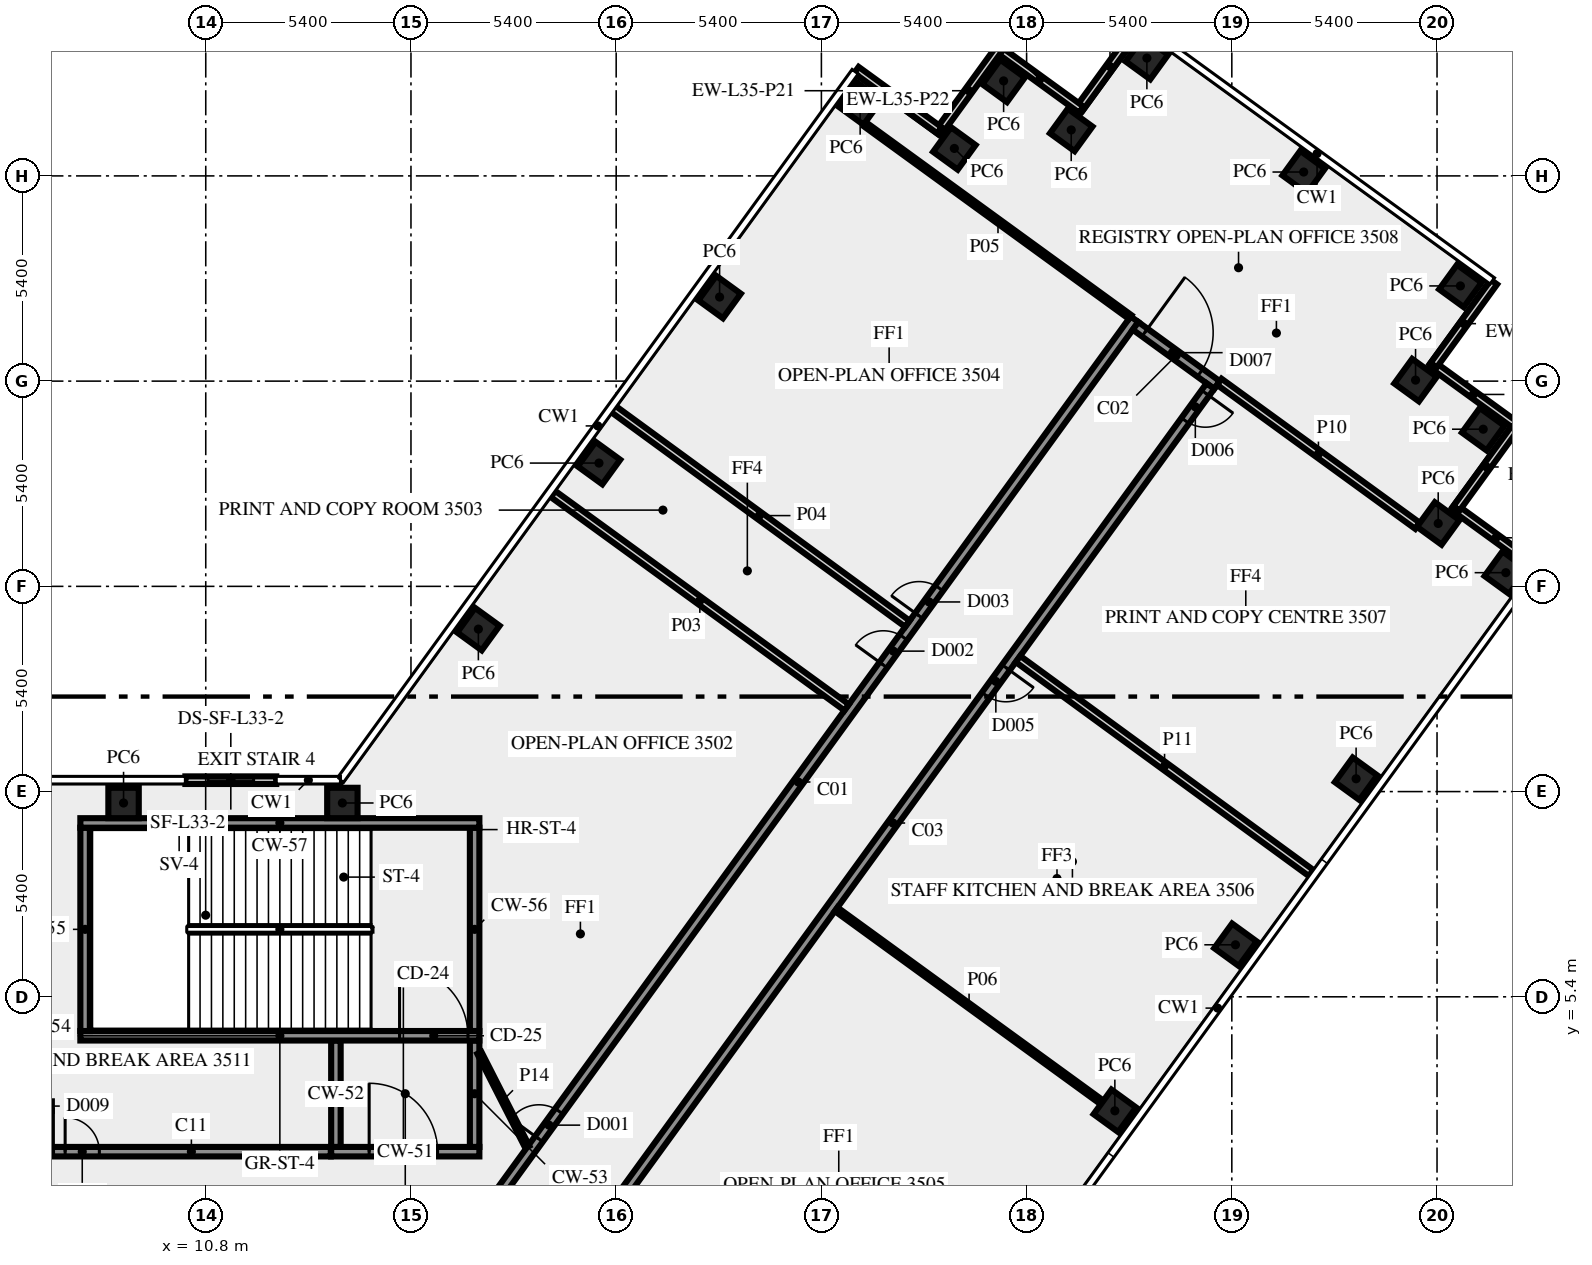
"""IFC4 building model, lengths in metres.
Left out: names, types, materials, properties, quantities, classifications, styles, units other than length and angle.
Written with IfcOpenShell. Run it as: python <this file> out.ifc"""

import sys

from ifc_helpers import new_model, si_unit, direction, frame, frame_2d, origin, origin_2d, place, context, subcontext, project, spatial, rectangle, extrude, element, fill, save


model = new_model("IFC4")
c1 = context("Model", 3, precision=1e-05, world=origin(), true_north=direction((0.0, 1.0)))
c2 = subcontext(c1, "Body", "Model", "MODEL_VIEW")
j1 = project(units=[si_unit("LENGTHUNIT", "METRE"), si_unit("PLANEANGLEUNIT", "RADIAN")], contexts=[c1])
p1 = place(None, origin())
s1 = spatial("IfcSite", under=j1, at=p1, CompositionType="ELEMENT")
p2 = place(p1, origin())
s2 = spatial("IfcBuilding", under=s1, at=p2, CompositionType="ELEMENT")
p3 = place(p2, frame((0.0, 0.0, 152.0)))
s3 = spatial("IfcBuildingStorey", under=s2, at=p3, CompositionType="ELEMENT", Elevation=152.0)
for number, where, z_axis, x_axis in (
    (1, (34.722, 2.4, 0.0), (0.0, 0.0, 1.0), (0.588, 0.809, 0.0)),
    (2, (37.896, 6.769, 0.0), (0.0, 0.0, 1.0), (0.588, 0.809, 0.0)),
    (3, (41.07, 11.137, 0.0), (0.0, 0.0, 1.0), (0.588, 0.809, 0.0)),
    (4, (45.01, 16.56, 0.0), (0.0, 0.0, 1.0), (0.588, 0.809, 0.0)),
    (5, (43.231, 17.854, 0.0), (0.0, 0.0, 1.0), (0.588, 0.809, 0.0)),
    (6, (44.415, 20.335, 0.0), (0.0, 0.0, 1.0), (0.588, 0.809, 0.0)),
    (7, (42.635, 21.626, 0.0), (0.0, 0.0, 1.0), (-0.809, 0.588, 0.0)),
    (8, (43.815, 24.105, 0.0), (0.0, 0.0, 1.0), (-0.809, 0.588, 0.0)),
    (9, (39.691, 27.102, 0.0), (0.0, 0.0, 1.0), (-0.809, 0.588, 0.0)),
    (10, (35.565, 30.1, 0.0), (0.0, 0.0, 1.0), (-0.588, -0.809, 0.0)),
    (11, (33.574, 28.209, 0.0), (0.0, 0.0, 1.0), (-0.809, 0.588, 0.0)),
    (12, (31.795, 29.5, 0.0), (0.0, 0.0, 1.0), (-0.588, -0.809, 0.0)),
    (13, (30.499, 27.723, 0.0), (0.0, 0.0, 1.0), (-0.809, 0.588, 0.0)),
    (14, (28.02, 28.905, 0.0), (0.0, 0.0, 1.0), (-0.809, 0.588, 0.0)),
    (15, (24.321, 23.812, 0.0), (0.0, 0.0, 1.0), (-0.588, -0.809, 0.0)),
    (16, (21.147, 19.444, 0.0), (0.0, 0.0, 1.0), (-0.588, -0.809, 0.0)),
    (17, (17.974, 15.075, 0.0), (0.0, 0.0, 1.0), (-0.588, -0.809, 0.0)),
    (18, (14.395, 10.5, 0.0), (0.0, 0.0, 1.0), (-1.0, 0.0, 0.0)),
    (19, (8.637, 10.5, 0.0), (0.0, 0.0, 1.0), (-1.0, 0.0, 0.0)),
):
    element("IfcColumn", number, at=place(p3, frame(where, z_axis=z_axis, x_axis=x_axis)), inside=s3, PredefinedType="COLUMN", context=c2, shape_type="SweptSolid", body=[
        extrude(rectangle(XDim=0.8, YDim=0.8, at=origin_2d()), origin(), (0.0, 0.0, 1.0), 3.65),
    ])
for number, where, z_axis, x_axis in (
    (20, (45.842, 16.685, 0.0), (0.0, 0.0, 1.0), (-0.809, 0.588, 0.0)),
    (21, (43.709, 18.249, 0.0), (0.0, 0.0, 1.0), (0.588, 0.809, 0.0)),
    (22, (45.245, 20.456, 0.0), (0.0, 0.0, 1.0), (-0.809, 0.588, 0.0)),
    (23, (43.113, 22.02, 0.0), (0.0, 0.0, 1.0), (0.588, 0.809, 0.0)),
    (24, (35.388, 30.97, 0.0), (0.0, 0.0, 1.0), (-0.588, -0.809, 0.0)),
    (25, (33.838, 28.744, 0.0), (0.0, 0.0, 1.0), (-0.809, 0.588, 0.0)),
    (26, (31.67, 30.333, 0.0), (0.0, 0.0, 1.0), (-0.588, -0.809, 0.0)),
    (27, (30.106, 28.2, 0.0), (0.0, 0.0, 1.0), (-0.809, 0.588, 0.0)),
):
    element("IfcWall", number, at=place(p3, frame(where, z_axis=z_axis, x_axis=x_axis)), inside=s3, PredefinedType="SOLIDWALL", context=c2, shape_type="SweptSolid", body=[
        extrude(rectangle(XDim=2.7, YDim=0.2, at=frame_2d((1.35, 0.0))), origin(), (0.0, 0.0, 1.0), 3.65),
    ])
p4 = place(p3, frame((12.655, 11.1, 0.0), z_axis=(0.0, 0.0, 1.0), x_axis=(-1.0, 0.0, 0.0)))
e28 = element("IfcWall", 28, at=p4, inside=s3, PredefinedType="SOLIDWALL", context=c2, shape_type="SweptSolid", body=[
    extrude(rectangle(XDim=2.392, YDim=0.2, at=frame_2d((1.196, 0.0))), origin(), (0.0, 0.0, 1.0), 3.65),
])
p5 = place(p4, frame((0.596, 0.0, 1.0)))
e29 = element("IfcOpeningElement", 29, at=p5, cuts=e28, PredefinedType="OPENING", context=c2, shape_type="SweptSolid", body=[
    extrude(rectangle(XDim=1.2, YDim=1.2, at=frame_2d((0.6, 0.6))), frame((0.0, 0.11, 0.0), z_axis=(0.0, -1.0, 0.0), x_axis=(1.0, 0.0, 0.0)), (0.0, 0.0, 1.0), 0.22),
])
p6 = place(p3, frame((14.1, 1.325, 0.0), z_axis=(0.0, 0.0, 1.0), x_axis=(1.0, 0.0, 0.0)))
e30 = element("IfcWall", 30, at=p6, inside=s3, PredefinedType="SHEAR", context=c2, shape_type="SweptSolid", body=[
    extrude(rectangle(XDim=3.9, YDim=0.25, at=frame_2d((1.95, 0.0))), origin(), (0.0, 0.0, 1.0), 3.65),
])
p7 = place(p6, frame((1.0, 0.0, 0.0)))
e31 = element("IfcOpeningElement", 31, at=p7, cuts=e30, PredefinedType="OPENING", context=c2, shape_type="SweptSolid", body=[
    extrude(rectangle(XDim=1.8, YDim=2.1, at=frame_2d((0.9, 1.05))), frame((0.0, 0.135, 0.0), z_axis=(0.0, -1.0, 0.0), x_axis=(1.0, 0.0, 0.0)), (0.0, 0.0, 1.0), 0.27),
])
for number, where, z_axis, x_axis in (
    (32, (14.225, 1.45, 0.0), (0.0, 0.0, 1.0), (0.0, 1.0, 0.0)),
    (33, (17.875, 1.45, 0.0), (0.0, 0.0, 1.0), (0.0, 1.0, 0.0)),
):
    element("IfcWall", number, at=place(p3, frame(where, z_axis=z_axis, x_axis=x_axis)), inside=s3, PredefinedType="SHEAR", context=c2, shape_type="SweptSolid", body=[
        extrude(rectangle(XDim=2.8, YDim=0.25, at=frame_2d((1.4, 0.0))), origin(), (0.0, 0.0, 1.0), 3.65),
    ])
p8 = place(p3, frame((7.5, 4.375, 0.0), z_axis=(0.0, 0.0, 1.0), x_axis=(1.0, 0.0, 0.0)))
e34 = element("IfcWall", 34, at=p8, inside=s3, PredefinedType="SHEAR", context=c2, shape_type="SweptSolid", body=[
    extrude(rectangle(XDim=10.5, YDim=0.25, at=frame_2d((5.25, 0.0))), origin(), (0.0, 0.0, 1.0), 3.65),
])
p9 = place(p8, frame((8.4, 0.0, 0.0)))
e35 = element("IfcOpeningElement", 35, at=p9, cuts=e34, PredefinedType="OPENING", context=c2, shape_type="SweptSolid", body=[
    extrude(rectangle(XDim=1.8, YDim=2.1, at=frame_2d((0.9, 1.05))), frame((0.0, 0.135, 0.0), z_axis=(0.0, -1.0, 0.0), x_axis=(1.0, 0.0, 0.0)), (0.0, 0.0, 1.0), 0.27),
])
for number, where, z_axis, x_axis in (
    (36, (7.625, 4.5, 0.0), (0.0, 0.0, 1.0), (0.0, 1.0, 0.0)),
    (37, (17.875, 4.5, 0.0), (0.0, 0.0, 1.0), (0.0, 1.0, 0.0)),
):
    element("IfcWall", number, at=place(p3, frame(where, z_axis=z_axis, x_axis=x_axis)), inside=s3, PredefinedType="SHEAR", context=c2, shape_type="SweptSolid", body=[
        extrude(rectangle(XDim=5.35, YDim=0.25, at=frame_2d((2.675, 0.0))), origin(), (0.0, 0.0, 1.0), 3.65),
    ])
p10 = place(p3, frame((7.5, 9.975, 0.0), z_axis=(0.0, 0.0, 1.0), x_axis=(1.0, 0.0, 0.0)))
e38 = element("IfcWall", 38, at=p10, inside=s3, PredefinedType="SHEAR", context=c2, shape_type="SweptSolid", body=[
    extrude(rectangle(XDim=10.5, YDim=0.25, at=frame_2d((5.25, 0.0))), origin(), (0.0, 0.0, 1.0), 3.65),
])
p11 = place(p10, frame((2.0, 0.0, 1.0)))
e39 = element("IfcOpeningElement", 39, at=p11, cuts=e38, PredefinedType="OPENING", context=c2, shape_type="SweptSolid", body=[
    extrude(rectangle(XDim=1.2, YDim=1.2, at=frame_2d((0.6, 0.6))), frame((0.0, 0.135, 0.0), z_axis=(0.0, -1.0, 0.0), x_axis=(1.0, 0.0, 0.0)), (0.0, 0.0, 1.0), 0.27),
])
p12 = place(p3, frame((17.545, -1.125, 0.0), z_axis=(0.0, 0.0, 1.0), x_axis=(0.587786330937, 0.809016210693, 0.0)))
e40 = element("IfcWall", 40, at=p12, inside=s3, PredefinedType="SOLIDWALL", context=c2, shape_type="SweptSolid", body=[
    extrude(rectangle(XDim=30.103, YDim=0.25, at=frame_2d((15.052, 0.0))), origin(), (0.0, 0.0, 1.0), 3.65),
])
p13 = place(p12, frame((3.441, 0.0, 0.0)))
e41 = element("IfcOpeningElement", 41, at=p13, cuts=e40, PredefinedType="OPENING", context=c2, shape_type="SweptSolid", body=[
    extrude(rectangle(XDim=0.9, YDim=2.1, at=frame_2d((0.45, 1.05))), frame((0.0, 0.135, 0.0), z_axis=(0.0, -1.0, 0.0), x_axis=(1.0, 0.0, 0.0)), (0.0, 0.0, 1.0), 0.27),
])
p14 = place(p12, frame((20.457, 0.0, 0.0)))
e42 = element("IfcOpeningElement", 42, at=p14, cuts=e40, PredefinedType="OPENING", context=c2, shape_type="SweptSolid", body=[
    extrude(rectangle(XDim=0.9, YDim=2.1, at=frame_2d((0.45, 1.05))), frame((0.0, 0.135, 0.0), z_axis=(0.0, -1.0, 0.0), x_axis=(1.0, 0.0, 0.0)), (0.0, 0.0, 1.0), 0.27),
])
p15 = place(p12, frame((18.858, 0.0, 0.0)))
e43 = element("IfcOpeningElement", 43, at=p15, cuts=e40, PredefinedType="OPENING", context=c2, shape_type="SweptSolid", body=[
    extrude(rectangle(XDim=0.9, YDim=2.1, at=frame_2d((0.45, 1.05))), frame((0.0, 0.135, 0.0), z_axis=(0.0, -1.0, 0.0), x_axis=(1.0, 0.0, 0.0)), (0.0, 0.0, 1.0), 0.27),
])
p16 = place(p3, frame((35.267, 23.054, 0.0), z_axis=(0.0, 0.0, 1.0), x_axis=(0.809038743598, -0.587755315891, 0.0)))
e44 = element("IfcWall", 44, at=p16, inside=s3, PredefinedType="SOLIDWALL", context=c2, shape_type="SweptSolid", body=[
    extrude(rectangle(XDim=2.65, YDim=0.25, at=frame_2d((1.325, 0.0))), origin(), (0.0, 0.0, 1.0), 3.65),
])
p17 = place(p16, frame((0.3, 0.0, 0.0)))
e45 = element("IfcOpeningElement", 45, at=p17, cuts=e44, PredefinedType="OPENING", context=c2, shape_type="SweptSolid", body=[
    extrude(rectangle(XDim=1.8, YDim=2.1, at=frame_2d((0.9, 1.05))), frame((0.0, 0.135, 0.0), z_axis=(0.0, -1.0, 0.0), x_axis=(1.0, 0.0, 0.0)), (0.0, 0.0, 1.0), 0.27),
])
p18 = place(p3, frame((37.236, 21.469, 0.0), z_axis=(0.0, 0.0, 1.0), x_axis=(-0.58778344073, -0.809018310549, 0.0)))
e46 = element("IfcWall", 46, at=p18, inside=s3, PredefinedType="SOLIDWALL", context=c2, shape_type="SweptSolid", body=[
    extrude(rectangle(XDim=28.42, YDim=0.25, at=frame_2d((14.21, 0.0))), origin(), (0.0, 0.0, 1.0), 3.65),
])
p19 = place(p18, frame((26.988, 0.0, 0.0)))
e47 = element("IfcOpeningElement", 47, at=p19, cuts=e46, PredefinedType="OPENING", context=c2, shape_type="SweptSolid", body=[
    extrude(rectangle(XDim=0.9, YDim=2.1, at=frame_2d((0.45, 1.05))), frame((0.0, 0.135, 0.0), z_axis=(0.0, -1.0, 0.0), x_axis=(1.0, 0.0, 0.0)), (0.0, 0.0, 1.0), 0.27),
])
p20 = place(p18, frame((0.224, 0.0, 0.0)))
e48 = element("IfcOpeningElement", 48, at=p20, cuts=e46, PredefinedType="OPENING", context=c2, shape_type="SweptSolid", body=[
    extrude(rectangle(XDim=0.9, YDim=2.1, at=frame_2d((0.45, 1.05))), frame((0.0, 0.135, 0.0), z_axis=(0.0, -1.0, 0.0), x_axis=(1.0, 0.0, 0.0)), (0.0, 0.0, 1.0), 0.27),
])
p21 = place(p18, frame((9.155, 0.0, 0.0)))
e49 = element("IfcOpeningElement", 49, at=p21, cuts=e46, PredefinedType="OPENING", context=c2, shape_type="SweptSolid", body=[
    extrude(rectangle(XDim=0.9, YDim=2.1, at=frame_2d((0.45, 1.05))), frame((0.0, 0.135, 0.0), z_axis=(0.0, -1.0, 0.0), x_axis=(1.0, 0.0, 0.0)), (0.0, 0.0, 1.0), 0.27),
])
p22 = place(p3, frame((6.754, 1.325, 0.0), z_axis=(0.0, 0.0, 1.0), x_axis=(1.0, 0.0, 0.0)))
e50 = element("IfcWall", 50, at=p22, inside=s3, PredefinedType="SOLIDWALL", context=c2, shape_type="SweptSolid", body=[
    extrude(rectangle(XDim=7.336, YDim=0.25, at=frame_2d((3.668, 0.0))), origin(), (0.0, 0.0, 1.0), 3.65),
])
p23 = place(p22, frame((0.346, 0.0, 0.0)))
e51 = element("IfcOpeningElement", 51, at=p23, cuts=e50, PredefinedType="OPENING", context=c2, shape_type="SweptSolid", body=[
    extrude(rectangle(XDim=0.9, YDim=2.1, at=frame_2d((0.45, 1.05))), frame((0.0, 0.135, 0.0), z_axis=(0.0, -1.0, 0.0), x_axis=(1.0, 0.0, 0.0)), (0.0, 0.0, 1.0), 0.27),
])
p24 = place(p3, frame((27.664, 13.016, 0.0), z_axis=(0.0, 0.0, 1.0), x_axis=(-0.80900684162, 0.587799226107, 0.0)))
e52 = element("IfcWall", 52, at=p24, inside=s3, PredefinedType="SOLIDWALL", context=c2, shape_type="SweptSolid", body=[
    extrude(rectangle(XDim=9.55, YDim=0.2, at=frame_2d((4.775, 0.0))), origin(), (0.0, 0.0, 1.0), 2.85),
])
p25 = place(p3, frame((21.469, 20.908, 0.0), z_axis=(0.0, 0.0, 1.0), x_axis=(0.807593618158, -0.589739389824, 0.0)))
e53 = element("IfcWall", 53, at=p25, inside=s3, PredefinedType="SOLIDWALL", context=c2, shape_type="SweptSolid", body=[
    extrude(rectangle(XDim=9.651, YDim=0.2, at=frame_2d((4.826, 0.0))), origin(), (0.0, 0.0, 1.0), 2.85),
])
p26 = place(p3, frame((35.126, 23.286, 0.0), z_axis=(0.0, 0.0, 1.0), x_axis=(-0.809030614944, 0.58776650473, 0.0)))
e54 = element("IfcWall", 54, at=p26, inside=s3, PredefinedType="PARTITIONING", context=c2, shape_type="SweptSolid", body=[
    extrude(rectangle(XDim=8.6, YDim=0.12, at=frame_2d((4.3, 0.0))), origin(), (0.0, 0.0, 1.0), 3.65),
])
p27 = place(p3, frame((34.383, 2.622, 0.0), z_axis=(0.0, 0.0, 1.0), x_axis=(-0.809060825193, 0.587724919617, 0.0)))
e55 = element("IfcWall", 55, at=p27, inside=s3, PredefinedType="PARTITIONING", context=c2, shape_type="SweptSolid", body=[
    extrude(rectangle(XDim=8.645, YDim=0.12, at=frame_2d((4.322, 0.0))), origin(), (0.0, 0.0, 1.0), 3.65),
])
p28 = place(p3, frame((42.686, 17.794, 0.0), z_axis=(0.0, 0.0, 1.0), x_axis=(-0.809017755079, 0.587784205272, 0.0)))
e56 = element("IfcWall", 56, at=p28, inside=s3, PredefinedType="SOLIDWALL", context=c2, shape_type="SweptSolid", body=[
    extrude(rectangle(XDim=6.445, YDim=0.2, at=frame_2d((3.222, 0.0))), origin(), (0.0, 0.0, 1.0), 3.65),
])
p29 = place(p3, frame((32.174, 14.288, 0.0), z_axis=(0.0, 0.0, 1.0), x_axis=(0.807664588563, -0.589642190131, 0.0)))
e57 = element("IfcWall", 57, at=p29, inside=s3, PredefinedType="SOLIDWALL", context=c2, shape_type="SweptSolid", body=[
    extrude(rectangle(XDim=9.55, YDim=0.2, at=frame_2d((4.775, 0.0))), origin(), (0.0, 0.0, 1.0), 2.85),
])
p30 = place(p3, frame((18.0, 3.925, 0.0), z_axis=(0.0, 0.0, 1.0), x_axis=(0.453950796792, -0.891026752736, 0.0)))
e58 = element("IfcWall", 58, at=p30, inside=s3, PredefinedType="PARTITIONING", context=c2, shape_type="SweptSolid", body=[
    extrude(rectangle(XDim=2.778, YDim=0.12, at=frame_2d((1.389, 0.0))), origin(), (0.0, 0.0, 1.0), 3.65),
])
p31 = place(p5, origin())
e59 = element("IfcWindow", 59, at=p31, inside=s3, PartitioningType="SINGLE_PANEL", PredefinedType="WINDOW", context=c2, shape_type="SweptSolid", body=[
    extrude(rectangle(XDim=1.2, YDim=1.2, at=frame_2d((0.6, 0.6))), frame((0.0, 0.03, 0.0), z_axis=(0.0, -1.0, 0.0), x_axis=(1.0, 0.0, 0.0)), (0.0, 0.0, 1.0), 0.06),
])
fill(e29, e59)
p32 = place(p7, origin())
e60 = element("IfcDoor", 60, at=p32, inside=s3, OperationType="DOUBLE_DOOR_SINGLE_SWING", PredefinedType="DOOR", context=c2, shape_type="SweptSolid", body=[
    extrude(rectangle(XDim=1.8, YDim=2.1, at=frame_2d((0.9, 1.05))), frame((0.0, 0.025, 0.0), z_axis=(0.0, -1.0, 0.0), x_axis=(1.0, 0.0, 0.0)), (0.0, 0.0, 1.0), 0.05),
])
fill(e31, e60)
p33 = place(p9, origin())
e61 = element("IfcDoor", 61, at=p33, inside=s3, OperationType="DOUBLE_DOOR_SINGLE_SWING", PredefinedType="DOOR", context=c2, shape_type="SweptSolid", body=[
    extrude(rectangle(XDim=1.8, YDim=2.1, at=frame_2d((0.9, 1.05))), frame((0.0, 0.025, 0.0), z_axis=(0.0, -1.0, 0.0), x_axis=(1.0, 0.0, 0.0)), (0.0, 0.0, 1.0), 0.05),
])
fill(e35, e61)
p34 = place(p11, origin())
e62 = element("IfcWindow", 62, at=p34, inside=s3, PartitioningType="SINGLE_PANEL", PredefinedType="WINDOW", context=c2, shape_type="SweptSolid", body=[
    extrude(rectangle(XDim=1.2, YDim=1.2, at=frame_2d((0.6, 0.6))), frame((0.0, 0.03, 0.0), z_axis=(0.0, -1.0, 0.0), x_axis=(1.0, 0.0, 0.0)), (0.0, 0.0, 1.0), 0.06),
])
fill(e39, e62)
p35 = place(p13, origin())
e63 = element("IfcDoor", 63, at=p35, inside=s3, OperationType="SINGLE_SWING_LEFT", PredefinedType="DOOR", context=c2, shape_type="SweptSolid", body=[
    extrude(rectangle(XDim=0.9, YDim=2.1, at=frame_2d((0.45, 1.05))), frame((0.0, 0.025, 0.0), z_axis=(0.0, -1.0, 0.0), x_axis=(1.0, 0.0, 0.0)), (0.0, 0.0, 1.0), 0.05),
])
fill(e41, e63)
p36 = place(p14, origin())
e64 = element("IfcDoor", 64, at=p36, inside=s3, OperationType="SINGLE_SWING_LEFT", PredefinedType="DOOR", context=c2, shape_type="SweptSolid", body=[
    extrude(rectangle(XDim=0.9, YDim=2.1, at=frame_2d((0.45, 1.05))), frame((0.0, 0.025, 0.0), z_axis=(0.0, -1.0, 0.0), x_axis=(1.0, 0.0, 0.0)), (0.0, 0.0, 1.0), 0.05),
])
fill(e42, e64)
p37 = place(p15, origin())
e65 = element("IfcDoor", 65, at=p37, inside=s3, OperationType="SINGLE_SWING_RIGHT", PredefinedType="DOOR", context=c2, shape_type="SweptSolid", body=[
    extrude(rectangle(XDim=0.9, YDim=2.1, at=frame_2d((0.45, 1.05))), frame((0.0, 0.025, 0.0), z_axis=(0.0, -1.0, 0.0), x_axis=(1.0, 0.0, 0.0)), (0.0, 0.0, 1.0), 0.05),
])
fill(e43, e65)
p38 = place(p20, origin())
e66 = element("IfcDoor", 66, at=p38, inside=s3, OperationType="SINGLE_SWING_LEFT", PredefinedType="DOOR", context=c2, shape_type="SweptSolid", body=[
    extrude(rectangle(XDim=0.9, YDim=2.1, at=frame_2d((0.45, 1.05))), frame((0.0, 0.025, 0.0), z_axis=(0.0, -1.0, 0.0), x_axis=(1.0, 0.0, 0.0)), (0.0, 0.0, 1.0), 0.05),
])
fill(e48, e66)
p39 = place(p17, origin())
e67 = element("IfcDoor", 67, at=p39, inside=s3, OperationType="DOUBLE_DOOR_SINGLE_SWING", PredefinedType="DOOR", context=c2, shape_type="SweptSolid", body=[
    extrude(rectangle(XDim=1.8, YDim=2.1, at=frame_2d((0.9, 1.05))), frame((0.0, 0.025, 0.0), z_axis=(0.0, -1.0, 0.0), x_axis=(1.0, 0.0, 0.0)), (0.0, 0.0, 1.0), 0.05),
])
fill(e45, e67)
p40 = place(p21, origin())
e68 = element("IfcDoor", 68, at=p40, inside=s3, OperationType="SINGLE_SWING_LEFT", PredefinedType="DOOR", context=c2, shape_type="SweptSolid", body=[
    extrude(rectangle(XDim=0.9, YDim=2.1, at=frame_2d((0.45, 1.05))), frame((0.0, 0.025, 0.0), z_axis=(0.0, -1.0, 0.0), x_axis=(1.0, 0.0, 0.0)), (0.0, 0.0, 1.0), 0.05),
])
fill(e49, e68)
p41 = place(p23, origin())
e69 = element("IfcDoor", 69, at=p41, inside=s3, OperationType="SINGLE_SWING_LEFT", PredefinedType="DOOR", context=c2, shape_type="SweptSolid", body=[
    extrude(rectangle(XDim=0.9, YDim=2.1, at=frame_2d((0.45, 1.05))), frame((0.0, 0.025, 0.0), z_axis=(0.0, -1.0, 0.0), x_axis=(1.0, 0.0, 0.0)), (0.0, 0.0, 1.0), 0.05),
])
fill(e51, e69)
save(model, sys.argv[1])
